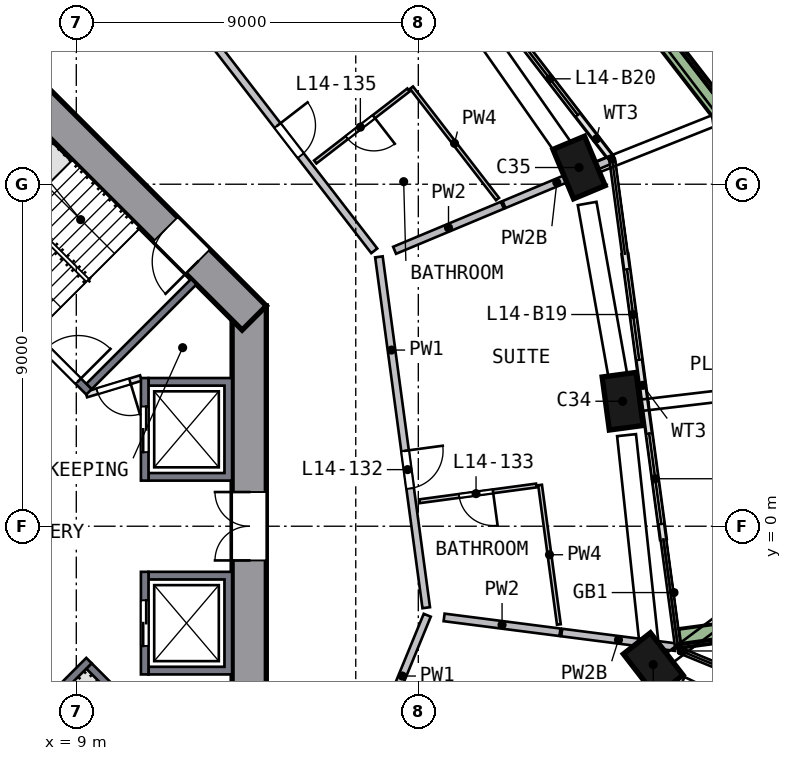
"""IFC4 building model, lengths in metres.
Left out: names, types, materials, properties, quantities, classifications, styles, units other than length and angle.
Written with IfcOpenShell. Run it as: python <this file> out.ifc"""

import sys

from ifc_helpers import new_model, si_unit, direction, frame, frame_2d, origin, origin_2d, place, context, subcontext, project, spatial, polyline, rectangle, outline, extrude, element, fill, save


model = new_model("IFC4")
c1 = context("Model", 3, precision=1e-05, world=origin(), true_north=direction((0.0, 1.0)))
c2 = subcontext(c1, "Body", "Model", "MODEL_VIEW")
j1 = project(units=[si_unit("LENGTHUNIT", "METRE"), si_unit("PLANEANGLEUNIT", "RADIAN")], contexts=[c1])
p1 = place(None, origin())
s1 = spatial("IfcSite", under=j1, at=p1, CompositionType="ELEMENT")
p2 = place(p1, origin())
s2 = spatial("IfcBuilding", under=s1, at=p2, CompositionType="ELEMENT")
p3 = place(p2, frame((0.0, 0.0, 64.5)))
s3 = spatial("IfcBuildingStorey", under=s2, at=p3, CompositionType="ELEMENT", Elevation=64.5)
p4 = place(p3, frame((24.16, -3.779, 0.0), z_axis=(0.017027467, 0.115011417, 0.993218223), x_axis=(0.614451168, -0.784852686, 0.080349384)))
e1 = element("IfcColumn", 1, at=p4, inside=s3, PredefinedType="COLUMN", context=c2, shape_type="SweptSolid", body=[
    extrude(rectangle(XDim=1.4, YDim=0.9, at=origin_2d()), origin(), (0.0, 0.0, 1.0), 3.212),
])
p5 = place(p3, frame((23.396, 3.155, 0.0), z_axis=(-0.015894502, 0.111185465, 0.99367256), x_axis=(-0.132268988, 0.984830426, -0.112311825)))
e2 = element("IfcColumn", 2, at=p5, inside=s3, PredefinedType="COLUMN", context=c2, shape_type="SweptSolid", body=[
    extrude(rectangle(XDim=1.4, YDim=0.9, at=origin_2d()), origin(), (0.0, 0.0, 1.0), 3.21),
])
p6 = place(p3, frame((22.284, 9.312, 0.0), z_axis=(-0.045160656, 0.105602947, 0.99338237), x_axis=(0.382830166, -0.916651807, 0.114850029)))
e3 = element("IfcColumn", 3, at=p6, inside=s3, PredefinedType="COLUMN", context=c2, shape_type="SweptSolid", body=[
    extrude(rectangle(XDim=1.4, YDim=0.9, at=origin_2d()), origin(), (0.0, 0.0, 1.0), 3.211),
])
p7 = place(p3, frame((13.55, -5.799, 0.0), z_axis=(0.0, 0.0, 1.0), x_axis=(0.0, 1.0, 0.0)))
e4 = element("IfcWall", 4, at=p7, inside=s3, PredefinedType="SHEAR", context=c2, shape_type="SweptSolid", body=[
    extrude(rectangle(XDim=11.598, YDim=0.9, at=frame_2d((5.799, 0.0))), origin(), (0.0, 0.0, 1.0), 3.5),
])
p8 = place(p7, frame((4.899, 0.0, 0.0)))
e5 = element("IfcOpeningElement", 5, at=p8, cuts=e4, PredefinedType="OPENING", context=c2, shape_type="SweptSolid", body=[
    extrude(rectangle(XDim=1.8, YDim=2.1, at=frame_2d((0.9, 1.05))), frame((0.0, 0.46, 0.0), z_axis=(0.0, -1.0, 0.0), x_axis=(1.0, 0.0, 0.0)), (0.0, 0.0, 1.0), 0.92),
])
p9 = place(p3, frame((13.682, 5.481, 0.0), z_axis=(0.0, 0.0, 1.0), x_axis=(-0.707106781, 0.707106781, 0.0)))
e6 = element("IfcWall", 6, at=p9, inside=s3, PredefinedType="SHEAR", context=c2, shape_type="SweptSolid", body=[
    extrude(rectangle(XDim=11.598, YDim=0.9, at=frame_2d((5.799, 0.0))), origin(), (0.0, 0.0, 1.0), 3.5),
])
p10 = place(p9, frame((2.099, 0.0, 0.0)))
e7 = element("IfcOpeningElement", 7, at=p10, cuts=e6, PredefinedType="OPENING", context=c2, shape_type="SweptSolid", body=[
    extrude(rectangle(XDim=1.2, YDim=2.1, at=frame_2d((0.6, 1.05))), frame((0.0, 0.46, 0.0), z_axis=(0.0, -1.0, 0.0), x_axis=(1.0, 0.0, 0.0)), (0.0, 0.0, 1.0), 0.92),
])
p11 = place(p3, frame((24.448, -0.336, 0.0), z_axis=(0.0, 0.0, 1.0), x_axis=(-0.133660502, 0.991027179, 0.0)))
e8 = element("IfcWall", 8, at=p11, inside=s3, PredefinedType="SOLIDWALL", context=c2, shape_type="SweptSolid", body=[
    extrude(rectangle(XDim=3.6, YDim=0.15, at=frame_2d((1.8, 0.0))), origin(), (0.0, 0.0, 1.0), 2.425),
])
p12 = place(p11, frame((0.4, 0.0, 0.0)))
e9 = element("IfcOpeningElement", 9, at=p12, cuts=e8, PredefinedType="OPENING", context=c2, shape_type="SweptSolid", body=[
    extrude(rectangle(XDim=2.4, YDim=2.4, at=frame_2d((1.2, 1.2))), frame((0.0, 0.085, 0.0), z_axis=(0.0, -1.0, 0.0), x_axis=(1.0, 0.0, 0.0)), (0.0, 0.0, 1.0), 0.17),
])
p13 = place(p3, frame((23.966, 3.232, 0.0), z_axis=(0.0, 0.0, 1.0), x_axis=(-0.133649548, 0.991028657, 0.0)))
e10 = element("IfcWall", 10, at=p13, inside=s3, PredefinedType="SOLIDWALL", context=c2, shape_type="SweptSolid", body=[
    extrude(rectangle(XDim=3.96, YDim=0.15, at=frame_2d((1.98, 0.0))), origin(), (0.0, 0.0, 1.0), 2.425),
])
p14 = place(p13, frame((1.16, 0.0, 0.0)))
e11 = element("IfcOpeningElement", 11, at=p14, cuts=e10, PredefinedType="OPENING", context=c2, shape_type="SweptSolid", body=[
    extrude(rectangle(XDim=2.4, YDim=2.4, at=frame_2d((1.2, 1.2))), frame((0.0, 0.085, 0.0), z_axis=(0.0, -1.0, 0.0), x_axis=(1.0, 0.0, 0.0)), (0.0, 0.0, 1.0), 0.17),
])
p15 = place(p3, frame((23.052, 9.717, 0.0), z_axis=(0.0, 0.0, 1.0), x_axis=(-0.611243928, 0.791442266, 0.0)))
e12 = element("IfcWall", 12, at=p15, inside=s3, PredefinedType="SOLIDWALL", context=c2, shape_type="SweptSolid", body=[
    extrude(rectangle(XDim=4.199, YDim=0.15, at=frame_2d((2.099, 0.0))), origin(), (0.0, 0.0, 1.0), 2.425),
])
p16 = place(p15, frame((1.399, 0.0, 0.0)))
e13 = element("IfcOpeningElement", 13, at=p16, cuts=e12, PredefinedType="OPENING", context=c2, shape_type="SweptSolid", body=[
    extrude(rectangle(XDim=2.4, YDim=2.4, at=frame_2d((1.2, 1.2))), frame((0.0, 0.085, 0.0), z_axis=(0.0, -1.0, 0.0), x_axis=(1.0, 0.0, 0.0)), (0.0, 0.0, 1.0), 0.17),
])
p17 = place(p3, frame((24.877, -2.952, 0.0), z_axis=(0.0, 0.0, 1.0), x_axis=(0.991031531, 0.133628231, 0.0)))
e14 = element("IfcWall", 14, at=p17, inside=s3, PredefinedType="SOLIDWALL", context=c2, shape_type="SweptSolid", body=[
    extrude(rectangle(XDim=3.199, YDim=0.5, at=frame_2d((1.6, 0.0))), origin(), (0.0, 0.0, 1.0), 0.7),
])
p18 = place(p3, frame((25.949, 10.914, 0.0), z_axis=(0.0, 0.0, 1.0), x_axis=(-0.611254575, 0.791434043, 0.0)))
e15 = element("IfcWall", 15, at=p18, inside=s3, PredefinedType="SOLIDWALL", context=c2, shape_type="SweptSolid", body=[
    extrude(rectangle(XDim=13.723, YDim=0.5, at=frame_2d((6.862, 0.0))), origin(), (0.0, 0.0, 1.0), 0.7),
])
p19 = place(p3, origin())
e16 = element("IfcWall", 16, at=p19, inside=s3, PredefinedType="SOLIDWALL", context=c2, shape_type="SweptSolid", body=[
    extrude(outline(polyline([(13.1, -3.9), (10.9, -3.9), (10.9, -3.7), (12.9, -3.7), (12.9, -1.4), (10.9, -1.4), (10.9, -1.2), (13.1, -1.2), (13.1, -3.9)])), origin(), (0.0, 0.0, 1.0), 3.19),
])
p20 = place(p3, frame((10.8, -1.2, 0.0), z_axis=(0.0, 0.0, 1.0), x_axis=(0.0, -1.0, 0.0)))
e17 = element("IfcWall", 17, at=p20, inside=s3, PredefinedType="SOLIDWALL", context=c2, shape_type="SweptSolid", body=[
    extrude(rectangle(XDim=2.7, YDim=0.2, at=frame_2d((1.35, 0.0))), origin(), (0.0, 0.0, 1.0), 3.19),
])
p21 = place(p20, frame((0.75, 0.0, 0.0)))
e18 = element("IfcOpeningElement", 18, at=p21, cuts=e17, PredefinedType="OPENING", context=c2, shape_type="SweptSolid", body=[
    extrude(rectangle(XDim=1.2, YDim=2.1, at=frame_2d((0.6, 1.05))), frame((0.0, 0.11, 0.0), z_axis=(0.0, -1.0, 0.0), x_axis=(1.0, 0.0, 0.0)), (0.0, 0.0, 1.0), 0.22),
])
p22 = place(p3, origin())
e19 = element("IfcWall", 19, at=p22, inside=s3, PredefinedType="SOLIDWALL", context=c2, shape_type="SweptSolid", body=[
    extrude(outline(polyline([(13.1, 3.9), (13.1, 1.2), (10.9, 1.2), (10.9, 1.4), (12.9, 1.4), (12.9, 3.7), (10.9, 3.7), (10.9, 3.9), (13.1, 3.9)])), origin(), (0.0, 0.0, 1.0), 3.19),
])
p23 = place(p3, frame((10.8, 1.2, 0.0), z_axis=(0.0, 0.0, 1.0), x_axis=(0.0, 1.0, 0.0)))
e20 = element("IfcWall", 20, at=p23, inside=s3, PredefinedType="SOLIDWALL", context=c2, shape_type="SweptSolid", body=[
    extrude(rectangle(XDim=2.7, YDim=0.2, at=frame_2d((1.35, 0.0))), origin(), (0.0, 0.0, 1.0), 3.19),
])
p24 = place(p23, frame((0.75, 0.0, 0.0)))
e21 = element("IfcOpeningElement", 21, at=p24, cuts=e20, PredefinedType="OPENING", context=c2, shape_type="SweptSolid", body=[
    extrude(rectangle(XDim=1.2, YDim=2.1, at=frame_2d((0.6, 1.05))), frame((0.0, 0.11, 0.0), z_axis=(0.0, -1.0, 0.0), x_axis=(1.0, 0.0, 0.0)), (0.0, 0.0, 1.0), 0.22),
])
p25 = place(p3, frame((3.535, 9.334, 0.0), z_axis=(0.0, 0.0, 1.0), x_axis=(0.707106781, -0.707106781, 0.0)))
e22 = element("IfcWall", 22, at=p25, inside=s3, PredefinedType="SOLIDWALL", context=c2, shape_type="SweptSolid", body=[
    extrude(rectangle(XDim=8.2, YDim=0.2, at=frame_2d((4.1, 0.0))), origin(), (0.0, 0.0, 1.0), 3.19),
])
p26 = place(p25, frame((6.6, 0.0, 0.0)))
e23 = element("IfcOpeningElement", 23, at=p26, cuts=e22, PredefinedType="OPENING", context=c2, shape_type="SweptSolid", body=[
    extrude(rectangle(XDim=1.2, YDim=2.1, at=frame_2d((0.6, 1.05))), frame((0.0, 0.11, 0.0), z_axis=(0.0, -1.0, 0.0), x_axis=(1.0, 0.0, 0.0)), (0.0, 0.0, 1.0), 0.22),
])
p27 = place(p3, frame((9.334, 3.677, 0.0), z_axis=(0.0, 0.0, 1.0), x_axis=(0.707106781, 0.707106781, 0.0)))
e24 = element("IfcWall", 24, at=p27, inside=s3, PredefinedType="SOLIDWALL", context=c2, shape_type="SweptSolid", body=[
    extrude(rectangle(XDim=3.9, YDim=0.2, at=frame_2d((1.95, 0.0))), origin(), (0.0, 0.0, 1.0), 3.19),
])
p28 = place(p3, frame((9.334, -3.535, 0.0), z_axis=(0.0, 0.0, 1.0), x_axis=(-0.707106781, -0.707106781, 0.0)))
e25 = element("IfcWall", 25, at=p28, inside=s3, PredefinedType="SOLIDWALL", context=c2, shape_type="SweptSolid", body=[
    extrude(rectangle(XDim=8.2, YDim=0.2, at=frame_2d((4.1, 0.0))), origin(), (0.0, 0.0, 1.0), 3.19),
])
p29 = place(p28, frame((6.6, 0.0, 0.0)))
e26 = element("IfcOpeningElement", 26, at=p29, cuts=e25, PredefinedType="OPENING", context=c2, shape_type="SweptSolid", body=[
    extrude(rectangle(XDim=1.2, YDim=2.1, at=frame_2d((0.6, 1.05))), frame((0.0, 0.11, 0.0), z_axis=(0.0, -1.0, 0.0), x_axis=(1.0, 0.0, 0.0)), (0.0, 0.0, 1.0), 0.22),
])
p30 = place(p3, frame((9.334, -3.677, 0.0), z_axis=(0.0, 0.0, 1.0), x_axis=(0.707106781, -0.707106781, 0.0)))
e27 = element("IfcWall", 27, at=p30, inside=s3, PredefinedType="SOLIDWALL", context=c2, shape_type="SweptSolid", body=[
    extrude(rectangle(XDim=3.9, YDim=0.2, at=frame_2d((1.95, 0.0))), origin(), (0.0, 0.0, 1.0), 3.19),
])
p31 = place(p3, frame((10.7, 3.9, 0.0), z_axis=(0.0, 0.0, 1.0), x_axis=(-0.957084567, -0.289808785, 0.0)))
e28 = element("IfcWall", 28, at=p31, inside=s3, PredefinedType="PARTITIONING", context=c2, shape_type="SweptSolid", body=[
    extrude(rectangle(XDim=1.501, YDim=0.15, at=frame_2d((0.75, 0.0))), origin(), (0.0, 0.0, 1.0), 3.19),
])
p32 = place(p31, frame((0.301, 0.0, 0.0)))
e29 = element("IfcOpeningElement", 29, at=p32, cuts=e28, PredefinedType="OPENING", context=c2, shape_type="SweptSolid", body=[
    extrude(rectangle(XDim=0.9, YDim=2.1, at=frame_2d((0.45, 1.05))), frame((0.0, 0.085, 0.0), z_axis=(0.0, -1.0, 0.0), x_axis=(1.0, 0.0, 0.0)), (0.0, 0.0, 1.0), 0.17),
])
p33 = place(p3, frame((11.146, 14.62, 0.0), z_axis=(0.0, 0.0, 1.0), x_axis=(0.611244608, -0.791441741, 0.0)))
e30 = element("IfcWall", 30, at=p33, inside=s3, PredefinedType="SOLIDWALL", context=c2, shape_type="SweptSolid", body=[
    extrude(rectangle(XDim=9.316, YDim=0.2, at=frame_2d((4.658, 0.0))), origin(), (0.0, 0.0, 1.0), 3.19),
])
p34 = place(p33, frame((5.15, 0.0, 0.0)))
e31 = element("IfcOpeningElement", 31, at=p34, cuts=e30, PredefinedType="OPENING", context=c2, shape_type="SweptSolid", body=[
    extrude(rectangle(XDim=1.0, YDim=2.1, at=frame_2d((0.5, 1.05))), frame((0.0, 0.11, 0.0), z_axis=(0.0, -1.0, 0.0), x_axis=(1.0, 0.0, 0.0)), (0.0, 0.0, 1.0), 0.22),
])
p35 = place(p3, frame((16.921, -5.542, 0.0), z_axis=(0.0, 0.0, 1.0), x_axis=(0.379798041, 0.925069429, 0.0)))
e32 = element("IfcWall", 32, at=p35, inside=s3, PredefinedType="SOLIDWALL", context=c2, shape_type="SweptSolid", body=[
    extrude(rectangle(XDim=3.458, YDim=0.2, at=frame_2d((1.729, 0.0))), origin(), (0.0, 0.0, 1.0), 3.19),
])
p36 = place(p3, frame((16.963, 7.089, 0.0), z_axis=(0.0, 0.0, 1.0), x_axis=(0.133643157, -0.991029519, 0.0)))
e33 = element("IfcWall", 33, at=p36, inside=s3, PredefinedType="SOLIDWALL", context=c2, shape_type="SweptSolid", body=[
    extrude(rectangle(XDim=9.317, YDim=0.2, at=frame_2d((4.658, 0.0))), origin(), (0.0, 0.0, 1.0), 3.19),
])
p37 = place(p36, frame((5.15, 0.0, 0.0)))
e34 = element("IfcOpeningElement", 34, at=p37, cuts=e33, PredefinedType="OPENING", context=c2, shape_type="SweptSolid", body=[
    extrude(rectangle(XDim=1.0, YDim=2.1, at=frame_2d((0.5, 1.05))), frame((0.0, 0.11, 0.0), z_axis=(0.0, -1.0, 0.0), x_axis=(1.0, 0.0, 0.0)), (0.0, 0.0, 1.0), 0.22),
])
p38 = place(p3, frame((17.376, 7.261, 0.0), z_axis=(0.0, 0.0, 1.0), x_axis=(0.922644096, 0.385652528, 0.0)))
e35 = element("IfcWall", 35, at=p38, inside=s3, PredefinedType="SOLIDWALL", context=c2, shape_type="SweptSolid", body=[
    extrude(rectangle(XDim=3.075, YDim=0.2, at=frame_2d((1.537, 0.0))), origin(), (0.0, 0.0, 1.0), 3.19),
])
p39 = place(p3, frame((18.678, -2.399, 0.0), z_axis=(0.0, 0.0, 1.0), x_axis=(0.991846962, -0.127434708, 0.0)))
e36 = element("IfcWall", 36, at=p39, inside=s3, PredefinedType="SOLIDWALL", context=c2, shape_type="SweptSolid", body=[
    extrude(rectangle(XDim=3.075, YDim=0.2, at=frame_2d((1.538, 0.0))), origin(), (0.0, 0.0, 1.0), 3.19),
])
p40 = place(p3, frame((20.255, 8.465, 0.0), z_axis=(0.0, 0.0, 1.0), x_axis=(0.922675862, 0.385576522, 0.0)))
e37 = element("IfcWall", 37, at=p40, inside=s3, PredefinedType="SOLIDWALL", context=c2, shape_type="SweptSolid", body=[
    extrude(rectangle(XDim=3.011, YDim=0.2, at=frame_2d((1.506, 0.0))), origin(), (0.0, 0.0, 1.0), 2.69),
])
p41 = place(p3, frame((21.774, -2.797, 0.0), z_axis=(0.0, 0.0, 1.0), x_axis=(0.991855686, -0.127366788, 0.0)))
e38 = element("IfcWall", 38, at=p41, inside=s3, PredefinedType="SOLIDWALL", context=c2, shape_type="SweptSolid", body=[
    extrude(rectangle(XDim=3.011, YDim=0.2, at=frame_2d((1.506, 0.0))), origin(), (0.0, 0.0, 1.0), 2.69),
])
p42 = place(p3, frame((17.741, 11.48, 0.0), z_axis=(0.0, 0.0, 1.0), x_axis=(-0.791472017, -0.611205405, 0.0)))
e39 = element("IfcWall", 39, at=p42, inside=s3, PredefinedType="PARTITIONING", context=c2, shape_type="SweptSolid", body=[
    extrude(rectangle(XDim=3.1, YDim=0.1, at=frame_2d((1.55, 0.0))), origin(), (0.0, 0.0, 1.0), 3.19),
])
p43 = place(p42, frame((1.15, 0.0, 0.0)))
e40 = element("IfcOpeningElement", 40, at=p43, cuts=e39, PredefinedType="OPENING", context=c2, shape_type="SweptSolid", body=[
    extrude(rectangle(XDim=0.9, YDim=2.1, at=frame_2d((0.45, 1.05))), frame((0.0, 0.06, 0.0), z_axis=(0.0, -1.0, 0.0), x_axis=(1.0, 0.0, 0.0)), (0.0, 0.0, 1.0), 0.12),
])
p44 = place(p3, frame((17.82, 11.542, 0.0), z_axis=(0.0, 0.0, 1.0), x_axis=(0.611235492, -0.791448781, 0.0)))
e41 = element("IfcWall", 41, at=p44, inside=s3, PredefinedType="PARTITIONING", context=c2, shape_type="SweptSolid", body=[
    extrude(rectangle(XDim=3.704, YDim=0.1, at=frame_2d((1.852, 0.0))), origin(), (0.0, 0.0, 1.0), 3.19),
])
p45 = place(p3, frame((21.104, 1.072, 0.0), z_axis=(0.0, 0.0, 1.0), x_axis=(-0.991029396, -0.133644063, 0.0)))
e42 = element("IfcWall", 42, at=p45, inside=s3, PredefinedType="PARTITIONING", context=c2, shape_type="SweptSolid", body=[
    extrude(rectangle(XDim=3.1, YDim=0.1, at=frame_2d((1.55, 0.0))), origin(), (0.0, 0.0, 1.0), 3.19),
])
p46 = place(p45, frame((1.15, 0.0, 0.0)))
e43 = element("IfcOpeningElement", 43, at=p46, cuts=e42, PredefinedType="OPENING", context=c2, shape_type="SweptSolid", body=[
    extrude(rectangle(XDim=0.9, YDim=2.1, at=frame_2d((0.45, 1.05))), frame((0.0, 0.06, 0.0), z_axis=(0.0, -1.0, 0.0), x_axis=(1.0, 0.0, 0.0)), (0.0, 0.0, 1.0), 0.12),
])
p47 = place(p3, frame((21.204, 1.085, 0.0), z_axis=(0.0, 0.0, 1.0), x_axis=(0.13360997, -0.991033993, 0.0)))
e44 = element("IfcWall", 44, at=p47, inside=s3, PredefinedType="PARTITIONING", context=c2, shape_type="SweptSolid", body=[
    extrude(rectangle(XDim=3.704, YDim=0.1, at=frame_2d((1.852, 0.0))), origin(), (0.0, 0.0, 1.0), 3.19),
])
p48 = place(p12, origin())
e45 = element("IfcDoor", 45, at=p48, inside=s3, OperationType="SLIDING_TO_RIGHT", PredefinedType="DOOR", context=c2, shape_type="SweptSolid", body=[
    extrude(rectangle(XDim=2.4, YDim=2.4, at=frame_2d((1.2, 1.2))), frame((0.0, 0.025, 0.0), z_axis=(0.0, -1.0, 0.0), x_axis=(1.0, 0.0, 0.0)), (0.0, 0.0, 1.0), 0.05),
])
fill(e9, e45)
p49 = place(p14, origin())
e46 = element("IfcDoor", 46, at=p49, inside=s3, OperationType="SLIDING_TO_LEFT", PredefinedType="DOOR", context=c2, shape_type="SweptSolid", body=[
    extrude(rectangle(XDim=2.4, YDim=2.4, at=frame_2d((1.2, 1.2))), frame((0.0, 0.025, 0.0), z_axis=(0.0, -1.0, 0.0), x_axis=(1.0, 0.0, 0.0)), (0.0, 0.0, 1.0), 0.05),
])
fill(e11, e46)
p50 = place(p16, origin())
e47 = element("IfcDoor", 47, at=p50, inside=s3, OperationType="SLIDING_TO_LEFT", PredefinedType="DOOR", context=c2, shape_type="SweptSolid", body=[
    extrude(rectangle(XDim=2.4, YDim=2.4, at=frame_2d((1.2, 1.2))), frame((0.0, 0.025, 0.0), z_axis=(0.0, -1.0, 0.0), x_axis=(1.0, 0.0, 0.0)), (0.0, 0.0, 1.0), 0.05),
])
fill(e13, e47)
p51 = place(p21, origin())
e48 = element("IfcDoor", 48, at=p51, inside=s3, OperationType="DOUBLE_DOOR_SLIDING", PredefinedType="DOOR", context=c2, shape_type="SweptSolid", body=[
    extrude(rectangle(XDim=1.2, YDim=2.1, at=frame_2d((0.6, 1.05))), frame((0.0, 0.025, 0.0), z_axis=(0.0, -1.0, 0.0), x_axis=(1.0, 0.0, 0.0)), (0.0, 0.0, 1.0), 0.05),
])
fill(e18, e48)
p52 = place(p24, origin())
e49 = element("IfcDoor", 49, at=p52, inside=s3, OperationType="DOUBLE_DOOR_SLIDING", PredefinedType="DOOR", context=c2, shape_type="SweptSolid", body=[
    extrude(rectangle(XDim=1.2, YDim=2.1, at=frame_2d((0.6, 1.05))), frame((0.0, 0.025, 0.0), z_axis=(0.0, -1.0, 0.0), x_axis=(1.0, 0.0, 0.0)), (0.0, 0.0, 1.0), 0.05),
])
fill(e21, e49)
p53 = place(p26, origin())
e50 = element("IfcDoor", 50, at=p53, inside=s3, OperationType="SINGLE_SWING_RIGHT", PredefinedType="DOOR", context=c2, shape_type="SweptSolid", body=[
    extrude(rectangle(XDim=1.2, YDim=2.1, at=frame_2d((0.6, 1.05))), frame((0.0, 0.025, 0.0), z_axis=(0.0, -1.0, 0.0), x_axis=(1.0, 0.0, 0.0)), (0.0, 0.0, 1.0), 0.05),
])
fill(e23, e50)
p54 = place(p8, origin())
e51 = element("IfcDoor", 51, at=p54, inside=s3, OperationType="DOUBLE_DOOR_SINGLE_SWING", PredefinedType="DOOR", context=c2, shape_type="SweptSolid", body=[
    extrude(rectangle(XDim=1.8, YDim=2.1, at=frame_2d((0.9, 1.05))), frame((0.0, 0.025, 0.0), z_axis=(0.0, -1.0, 0.0), x_axis=(1.0, 0.0, 0.0)), (0.0, 0.0, 1.0), 0.05),
])
fill(e5, e51)
p55 = place(p10, origin())
e52 = element("IfcDoor", 52, at=p55, inside=s3, OperationType="SINGLE_SWING_LEFT", PredefinedType="DOOR", context=c2, shape_type="SweptSolid", body=[
    extrude(rectangle(XDim=1.2, YDim=2.1, at=frame_2d((0.6, 1.05))), frame((0.0, 0.025, 0.0), z_axis=(0.0, -1.0, 0.0), x_axis=(1.0, 0.0, 0.0)), (0.0, 0.0, 1.0), 0.05),
])
fill(e7, e52)
p56 = place(p32, origin())
e53 = element("IfcDoor", 53, at=p56, inside=s3, OperationType="SINGLE_SWING_LEFT", PredefinedType="DOOR", context=c2, shape_type="SweptSolid", body=[
    extrude(rectangle(XDim=0.9, YDim=2.1, at=frame_2d((0.45, 1.05))), frame((0.0, 0.025, 0.0), z_axis=(0.0, -1.0, 0.0), x_axis=(1.0, 0.0, 0.0)), (0.0, 0.0, 1.0), 0.05),
])
fill(e29, e53)
p57 = place(p37, origin())
e54 = element("IfcDoor", 54, at=p57, inside=s3, OperationType="SINGLE_SWING_LEFT", PredefinedType="DOOR", context=c2, shape_type="SweptSolid", body=[
    extrude(rectangle(XDim=1.0, YDim=2.1, at=frame_2d((0.5, 1.05))), frame((0.0, 0.025, 0.0), z_axis=(0.0, -1.0, 0.0), x_axis=(1.0, 0.0, 0.0)), (0.0, 0.0, 1.0), 0.05),
])
fill(e34, e54)
p58 = place(p46, origin())
e55 = element("IfcDoor", 55, at=p58, inside=s3, OperationType="SINGLE_SWING_LEFT", PredefinedType="DOOR", context=c2, shape_type="SweptSolid", body=[
    extrude(rectangle(XDim=0.9, YDim=2.1, at=frame_2d((0.45, 1.05))), frame((0.0, 0.025, 0.0), z_axis=(0.0, -1.0, 0.0), x_axis=(1.0, 0.0, 0.0)), (0.0, 0.0, 1.0), 0.05),
])
fill(e43, e55)
p59 = place(p34, origin())
e56 = element("IfcDoor", 56, at=p59, inside=s3, OperationType="SINGLE_SWING_LEFT", PredefinedType="DOOR", context=c2, shape_type="SweptSolid", body=[
    extrude(rectangle(XDim=1.0, YDim=2.1, at=frame_2d((0.5, 1.05))), frame((0.0, 0.025, 0.0), z_axis=(0.0, -1.0, 0.0), x_axis=(1.0, 0.0, 0.0)), (0.0, 0.0, 1.0), 0.05),
])
fill(e31, e56)
p60 = place(p43, origin())
e57 = element("IfcDoor", 57, at=p60, inside=s3, OperationType="SINGLE_SWING_LEFT", PredefinedType="DOOR", context=c2, shape_type="SweptSolid", body=[
    extrude(rectangle(XDim=0.9, YDim=2.1, at=frame_2d((0.45, 1.05))), frame((0.0, 0.025, 0.0), z_axis=(0.0, -1.0, 0.0), x_axis=(1.0, 0.0, 0.0)), (0.0, 0.0, 1.0), 0.05),
])
fill(e40, e57)
save(model, sys.argv[1])
